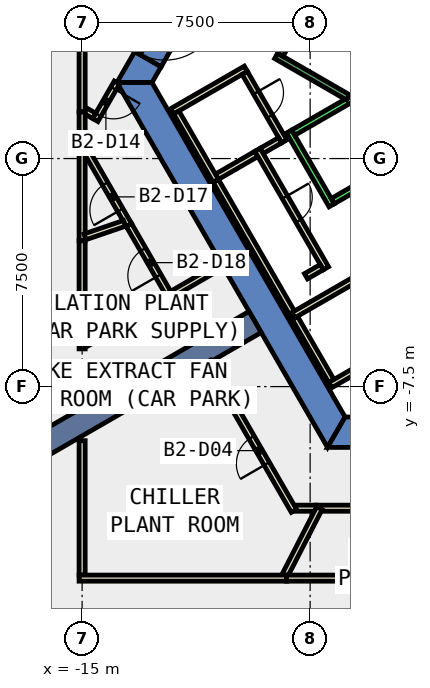
"""IFC4 building model, lengths in metres.
Left out: names, types, materials, properties, quantities, classifications, styles, units other than length and angle.
Written with IfcOpenShell. Run it as: python <this file> out.ifc"""

import sys

from ifc_helpers import new_model, si_unit, direction, frame, frame_2d, origin, place, context, subcontext, project, spatial, polyline, rectangle, outline, extrude, element, fill, save


model = new_model("IFC4")
c1 = context("Model", 3, precision=1e-05, world=origin(), true_north=direction((0.0, 1.0)))
c2 = subcontext(c1, "Body", "Model", "MODEL_VIEW")
j1 = project(units=[si_unit("LENGTHUNIT", "METRE"), si_unit("PLANEANGLEUNIT", "RADIAN")], contexts=[c1])
p1 = place(None, origin())
s1 = spatial("IfcSite", under=j1, at=p1, CompositionType="ELEMENT")
p2 = place(p1, origin())
s2 = spatial("IfcBuilding", under=s1, at=p2, CompositionType="ELEMENT")
p3 = place(p2, frame((0.0, 0.0, -11.0)))
s3 = spatial("IfcBuildingStorey", under=s2, at=p3, CompositionType="ELEMENT", Elevation=-11.0)
p4 = place(p3, frame((0.0, 0.0, -0.42)))
e1 = element("IfcWall", 1, at=p4, inside=s3, PredefinedType="SHEAR", context=c2, shape_type="SweptSolid", body=[
    extrude(outline(polyline([(-12.402, 3.02), (-13.267, 3.52), (-13.856, 2.5), (-12.702, 2.5), (-12.402, 3.02)])), origin(), (0.0, 0.0, 1.0), 5.5),
])
p5 = place(p3, frame((0.0, 0.0, 3.6)))
e2 = element("IfcWall", 2, at=p5, inside=s3, PredefinedType="SHEAR", context=c2, shape_type="SweptSolid", body=[
    extrude(outline(polyline([(-13.267, 3.52), (-12.402, 3.02), (-11.402, 4.752), (-12.267, 5.252), (-13.267, 3.52)])), origin(), (0.0, 0.0, 1.0), 1.48),
])
p6 = place(p3, frame((0.0, 0.0, -0.42)))
e3 = element("IfcWall", 3, at=p6, inside=s3, PredefinedType="SHEAR", context=c2, shape_type="SweptSolid", body=[
    extrude(outline(polyline([(-13.856, 2.5), (-6.928, -9.5), (-6.351, -8.5), (-12.702, 2.5), (-13.856, 2.5)])), origin(), (0.0, 0.0, 1.0), 5.5),
])
p7 = place(p3, frame((0.0, 0.0, -0.42)))
e4 = element("IfcWall", 4, at=p7, inside=s3, PredefinedType="SHEAR", context=c2, shape_type="SweptSolid", body=[
    extrude(outline(polyline([(3.75, -9.5), (3.75, -8.5), (-6.351, -8.5), (-6.928, -9.5), (3.75, -9.5)])), origin(), (0.0, 0.0, 1.0), 5.5),
])
p8 = place(p3, frame((-9.31, -5.375, -0.42), z_axis=(0.0, 0.0, 1.0), x_axis=(-0.866017533419, -0.500013631625, 0.0)))
e5 = element("IfcWall", 5, at=p8, inside=s3, PredefinedType="SHEAR", context=c2, shape_type="SweptSolid", body=[
    extrude(rectangle(XDim=9.0, YDim=0.8, at=frame_2d((4.5, 0.0))), origin(), (0.0, 0.0, 1.0), 5.5),
])
p9 = place(p3, frame((-7.296, -11.5, 0.0), z_axis=(0.0, 0.0, 1.0), x_axis=(-1.0, 0.0, 0.0)))
e6 = element("IfcWall", 6, at=p9, inside=s3, PredefinedType="PARTITIONING", context=c2, shape_type="SweptSolid", body=[
    extrude(rectangle(XDim=0.687, YDim=0.2, at=frame_2d((0.344, 0.0))), origin(), (0.0, 0.0, 1.0), 5.05),
])
p10 = place(p3, frame((-8.033, -11.587, 0.0), z_axis=(0.0, 0.0, 1.0), x_axis=(-0.499974742752, 0.866039985572, 0.0)))
e7 = element("IfcWall", 7, at=p10, inside=s3, PredefinedType="PARTITIONING", context=c2, shape_type="SweptSolid", body=[
    extrude(rectangle(XDim=5.668, YDim=0.2, at=frame_2d((2.834, 0.0))), origin(), (0.0, 0.0, 1.0), 5.05),
])
p11 = place(p10, frame((1.788, 0.0, 0.0)))
e8 = element("IfcOpeningElement", 8, at=p11, cuts=e7, PredefinedType="OPENING", context=c2, shape_type="SweptSolid", body=[
    extrude(rectangle(XDim=1.0, YDim=2.1, at=frame_2d((0.5, 1.05))), frame((0.0, 0.11, 0.0), z_axis=(0.0, -1.0, 0.0), x_axis=(1.0, 0.0, 0.0)), (0.0, 0.0, 1.0), 0.22),
])
p12 = place(p3, frame((1.35, -11.5, 0.0), z_axis=(0.0, 0.0, 1.0), x_axis=(-1.0, 0.0, 0.0)))
e9 = element("IfcWall", 9, at=p12, inside=s3, PredefinedType="PARTITIONING", context=c2, shape_type="SweptSolid", body=[
    extrude(rectangle(XDim=8.646, YDim=0.2, at=frame_2d((4.323, 0.0))), origin(), (0.0, 0.0, 1.0), 5.05),
])
p13 = place(p12, frame((3.768, 0.0, 0.0)))
e10 = element("IfcOpeningElement", 10, at=p13, cuts=e9, PredefinedType="OPENING", context=c2, shape_type="SweptSolid", body=[
    extrude(rectangle(XDim=1.0, YDim=2.1, at=frame_2d((0.5, 1.05))), frame((0.0, 0.11, 0.0), z_axis=(0.0, -1.0, 0.0), x_axis=(1.0, 0.0, 0.0)), (0.0, 0.0, 1.0), 0.22),
])
p14 = place(p3, frame((-7.196, -11.5, 0.0), z_axis=(0.0, 0.0, 1.0), x_axis=(-0.457008432814, -0.889462361394, 0.0)))
e11 = element("IfcWall", 11, at=p14, inside=s3, PredefinedType="PARTITIONING", context=c2, shape_type="SweptSolid", body=[
    extrude(rectangle(XDim=2.486, YDim=0.2, at=frame_2d((1.243, 0.0))), origin(), (0.0, 0.0, 1.0), 5.05),
])
p15 = place(p3, frame((-15.0, -13.7, 0.0), z_axis=(0.0, 0.0, 1.0), x_axis=(0.0, 1.0, 0.0)))
e12 = element("IfcWall", 12, at=p15, inside=s3, PredefinedType="PARTITIONING", context=c2, shape_type="SweptSolid", body=[
    extrude(rectangle(XDim=4.42, YDim=0.2, at=frame_2d((2.21, 0.0))), origin(), (0.0, 0.0, 1.0), 5.05),
])
p16 = place(p3, frame((-8.278, -13.8, 0.0), z_axis=(0.0, 0.0, 1.0), x_axis=(-1.0, 0.0, 0.0)))
e13 = element("IfcWall", 13, at=p16, inside=s3, PredefinedType="PARTITIONING", context=c2, shape_type="SweptSolid", body=[
    extrude(rectangle(XDim=6.822, YDim=0.2, at=frame_2d((3.411, 0.0))), origin(), (0.0, 0.0, 1.0), 5.05),
])
p17 = place(p3, frame((1.497, -13.8, 0.0), z_axis=(0.0, 0.0, 1.0), x_axis=(-1.0, 0.0, 0.0)))
e14 = element("IfcWall", 14, at=p17, inside=s3, PredefinedType="PARTITIONING", context=c2, shape_type="SweptSolid", body=[
    extrude(rectangle(XDim=9.775, YDim=0.2, at=frame_2d((4.888, 0.0))), origin(), (0.0, 0.0, 1.0), 5.05),
])
p18 = place(p3, frame((-13.856, 2.5, 0.0), z_axis=(0.0, 0.0, 1.0), x_axis=(-0.499831418649, -0.866122712398, 0.0)))
e15 = element("IfcWall", 15, at=p18, inside=s3, PredefinedType="PARTITIONING", context=c2, shape_type="SweptSolid", body=[
    extrude(rectangle(XDim=1.422, YDim=0.2, at=frame_2d((0.711, 0.0))), origin(), (0.0, 0.0, 1.0), 5.05),
])
p19 = place(p18, frame((0.224, 0.0, 0.0)))
e16 = element("IfcOpeningElement", 16, at=p19, cuts=e15, PredefinedType="OPENING", context=c2, shape_type="SweptSolid", body=[
    extrude(rectangle(XDim=1.0, YDim=2.1, at=frame_2d((0.5, 1.05))), frame((0.0, 0.11, 0.0), z_axis=(0.0, -1.0, 0.0), x_axis=(1.0, 0.0, 0.0)), (0.0, 0.0, 1.0), 0.22),
])
p20 = place(p3, frame((-14.604, 1.405, 0.0), z_axis=(0.0, 0.0, 1.0), x_axis=(-0.865410684717, 0.501063216349, 0.0)))
e17 = element("IfcWall", 17, at=p20, inside=s3, PredefinedType="PARTITIONING", context=c2, shape_type="SweptSolid", body=[
    extrude(rectangle(XDim=0.357, YDim=0.2, at=frame_2d((0.179, 0.0))), origin(), (0.0, 0.0, 1.0), 5.05),
])
p21 = place(p3, frame((-15.0, 1.534, 0.0), z_axis=(0.0, 0.0, 1.0), x_axis=(0.0, 1.0, 0.0)))
e18 = element("IfcWall", 18, at=p21, inside=s3, PredefinedType="PARTITIONING", context=c2, shape_type="SweptSolid", body=[
    extrude(rectangle(XDim=3.784, YDim=0.2, at=frame_2d((1.892, 0.0))), origin(), (0.0, 0.0, 1.0), 5.05),
])
p22 = place(p3, frame((-10.392, -3.5, 0.0), z_axis=(0.0, 0.0, 1.0), x_axis=(-0.865980106173, -0.500078449558, 0.0)))
e19 = element("IfcWall", 19, at=p22, inside=s3, PredefinedType="PARTITIONING", context=c2, shape_type="SweptSolid", body=[
    extrude(rectangle(XDim=1.9, YDim=0.2, at=frame_2d((0.95, 0.0))), origin(), (0.0, 0.0, 1.0), 5.05),
])
p23 = place(p3, frame((-15.0, 0.581, 0.0), z_axis=(0.0, 0.0, 1.0), x_axis=(0.0, 1.0, 0.0)))
e20 = element("IfcWall", 20, at=p23, inside=s3, PredefinedType="PARTITIONING", context=c2, shape_type="SweptSolid", body=[
    extrude(rectangle(XDim=0.953, YDim=0.2, at=frame_2d((0.477, 0.0))), origin(), (0.0, 0.0, 1.0), 5.05),
])
p24 = place(p3, frame((-13.46, -2.186, 0.0), z_axis=(0.0, 0.0, 1.0), x_axis=(-0.500060979923, 0.865990194147, 0.0)))
e21 = element("IfcWall", 21, at=p24, inside=s3, PredefinedType="PARTITIONING", context=c2, shape_type="SweptSolid", body=[
    extrude(rectangle(XDim=3.08, YDim=0.2, at=frame_2d((1.54, 0.0))), origin(), (0.0, 0.0, 1.0), 5.05),
])
p25 = place(p24, frame((0.569, 0.0, 0.0)))
e22 = element("IfcOpeningElement", 22, at=p25, cuts=e21, PredefinedType="OPENING", context=c2, shape_type="SweptSolid", body=[
    extrude(rectangle(XDim=1.0, YDim=2.1, at=frame_2d((0.5, 1.05))), frame((0.0, 0.11, 0.0), z_axis=(0.0, -1.0, 0.0), x_axis=(1.0, 0.0, 0.0)), (0.0, 0.0, 1.0), 0.22),
])
p26 = place(p3, frame((-12.124, -4.5, 0.0), z_axis=(0.0, 0.0, 1.0), x_axis=(-0.499991375441, 0.866030383119, 0.0)))
e23 = element("IfcWall", 23, at=p26, inside=s3, PredefinedType="PARTITIONING", context=c2, shape_type="SweptSolid", body=[
    extrude(rectangle(XDim=2.672, YDim=0.2, at=frame_2d((1.336, 0.0))), origin(), (0.0, 0.0, 1.0), 5.05),
])
p27 = place(p26, frame((0.743, 0.0, 0.0)))
e24 = element("IfcOpeningElement", 24, at=p27, cuts=e23, PredefinedType="OPENING", context=c2, shape_type="SweptSolid", body=[
    extrude(rectangle(XDim=1.0, YDim=2.1, at=frame_2d((0.5, 1.05))), frame((0.0, 0.11, 0.0), z_axis=(0.0, -1.0, 0.0), x_axis=(1.0, 0.0, 0.0)), (0.0, 0.0, 1.0), 0.22),
])
p28 = place(p3, frame((-15.0, -2.706, 0.0), z_axis=(0.0, 0.0, 1.0), x_axis=(0.0, 1.0, 0.0)))
e25 = element("IfcWall", 25, at=p28, inside=s3, PredefinedType="PARTITIONING", context=c2, shape_type="SweptSolid", body=[
    extrude(rectangle(XDim=3.287, YDim=0.2, at=frame_2d((1.644, 0.0))), origin(), (0.0, 0.0, 1.0), 5.05),
])
p29 = place(p3, frame((-12.037, -4.45, 0.0), z_axis=(0.0, 0.0, 1.0), x_axis=(-0.866063163075, -0.499934593286, 0.0)))
e26 = element("IfcWall", 26, at=p29, inside=s3, PredefinedType="PARTITIONING", context=c2, shape_type="SweptSolid", body=[
    extrude(rectangle(XDim=3.321, YDim=0.2, at=frame_2d((1.66, 0.0))), origin(), (0.0, 0.0, 1.0), 5.05),
])
p30 = place(p3, frame((-15.0, -6.26, 0.0), z_axis=(0.0, 0.0, 1.0), x_axis=(0.0, 1.0, 0.0)))
e27 = element("IfcWall", 27, at=p30, inside=s3, PredefinedType="PARTITIONING", context=c2, shape_type="SweptSolid", body=[
    extrude(rectangle(XDim=3.554, YDim=0.2, at=frame_2d((1.777, 0.0))), origin(), (0.0, 0.0, 1.0), 5.05),
])
p31 = place(p3, frame((-13.605, -2.131, 0.0), z_axis=(0.0, 0.0, 1.0), x_axis=(-0.946582963452, -0.32246037478, 0.0)))
e28 = element("IfcWall", 28, at=p31, inside=s3, PredefinedType="PARTITIONING", context=c2, shape_type="SweptSolid", body=[
    extrude(rectangle(XDim=1.373, YDim=0.2, at=frame_2d((0.687, 0.0))), origin(), (0.0, 0.0, 1.0), 5.05),
])
p32 = place(p3, frame((-9.267, 0.152, 0.0), z_axis=(0.0, 0.0, 1.0), x_axis=(-0.86599040064, -0.500060622324, 0.0)))
e29 = element("IfcWall", 29, at=p32, inside=s3, PredefinedType="PARTITIONING", context=c2, shape_type="SweptSolid", body=[
    extrude(rectangle(XDim=1.5, YDim=0.2, at=frame_2d((0.75, 0.0))), origin(), (0.0, 0.0, 1.0), 5.05),
])
p33 = place(p3, frame((-12.04, 1.553, 0.0), z_axis=(0.0, 0.0, 1.0), x_axis=(0.866056369097, 0.49994636267, 0.0)))
e30 = element("IfcWall", 30, at=p33, inside=s3, PredefinedType="PARTITIONING", context=c2, shape_type="SweptSolid", body=[
    extrude(rectangle(XDim=2.8, YDim=0.2, at=frame_2d((1.4, 0.0))), origin(), (0.0, 0.0, 1.0), 5.05),
])
p34 = place(p3, frame((-9.651, 2.817, 0.0), z_axis=(0.0, 0.0, 1.0), x_axis=(0.49989585183, -0.866085525409, 0.0)))
e31 = element("IfcWall", 31, at=p34, inside=s3, PredefinedType="PARTITIONING", context=c2, shape_type="SweptSolid", body=[
    extrude(rectangle(XDim=2.6, YDim=0.2, at=frame_2d((1.3, 0.0))), origin(), (0.0, 0.0, 1.0), 5.05),
])
p35 = place(p34, frame((0.75, 0.0, 0.0)))
e32 = element("IfcOpeningElement", 32, at=p35, cuts=e31, PredefinedType="OPENING", context=c2, shape_type="SweptSolid", body=[
    extrude(rectangle(XDim=0.9, YDim=2.1, at=frame_2d((0.45, 1.05))), frame((0.0, 0.11, 0.0), z_axis=(0.0, -1.0, 0.0), x_axis=(1.0, 0.0, 0.0)), (0.0, 0.0, 1.0), 0.22),
])
p36 = place(p3, frame((-8.488, 0.602, 0.0), z_axis=(0.0, 0.0, 1.0), x_axis=(-0.865871789474, -0.500265973451, 0.0)))
e33 = element("IfcWall", 33, at=p36, inside=s3, PredefinedType="PARTITIONING", context=c2, shape_type="SweptSolid", body=[
    extrude(rectangle(XDim=0.7, YDim=0.2, at=frame_2d((0.35, 0.0))), origin(), (0.0, 0.0, 1.0), 5.05),
])
p37 = place(p3, frame((-10.603, -0.735, 0.0), z_axis=(0.0, 0.0, 1.0), x_axis=(-0.499925626596, 0.866068339032, 0.0)))
e34 = element("IfcWall", 34, at=p37, inside=s3, PredefinedType="PARTITIONING", context=c2, shape_type="SweptSolid", body=[
    extrude(rectangle(XDim=2.601, YDim=0.2, at=frame_2d((1.3, 0.0))), origin(), (0.0, 0.0, 1.0), 5.05),
])
p38 = place(p3, frame((-9.231, 0.288, 0.0), z_axis=(0.0, 0.0, 1.0), x_axis=(0.500013631625, -0.866017533419, 0.0)))
e35 = element("IfcWall", 35, at=p38, inside=s3, PredefinedType="PARTITIONING", context=c2, shape_type="SweptSolid", body=[
    extrude(rectangle(XDim=4.5, YDim=0.2, at=frame_2d((2.25, 0.0))), origin(), (0.0, 0.0, 1.0), 5.05),
])
p39 = place(p38, frame((1.8, 0.0, 0.0)))
e36 = element("IfcOpeningElement", 36, at=p39, cuts=e35, PredefinedType="OPENING", context=c2, shape_type="SweptSolid", body=[
    extrude(rectangle(XDim=0.9, YDim=2.1, at=frame_2d((0.45, 1.05))), frame((0.0, 0.11, 0.0), z_axis=(0.0, -1.0, 0.0), x_axis=(1.0, 0.0, 0.0)), (0.0, 0.0, 1.0), 0.22),
])
p40 = place(p3, frame((-7.117, -3.572, 0.0), z_axis=(0.0, 0.0, 1.0), x_axis=(-0.866158505053, -0.499769390944, 0.0)))
e37 = element("IfcWall", 37, at=p40, inside=s3, PredefinedType="PARTITIONING", context=c2, shape_type="SweptSolid", body=[
    extrude(rectangle(XDim=0.6, YDim=0.2, at=frame_2d((0.3, 0.0))), origin(), (0.0, 0.0, 1.0), 5.05),
])
p41 = place(p3, frame((-8.003, -5.238, 0.0), z_axis=(0.0, 0.0, 1.0), x_axis=(-0.500047596559, 0.865997922154, 0.0)))
e38 = element("IfcWall", 38, at=p41, inside=s3, PredefinedType="PARTITIONING", context=c2, shape_type="SweptSolid", body=[
    extrude(rectangle(XDim=5.2, YDim=0.2, at=frame_2d((2.6, 0.0))), origin(), (0.0, 0.0, 1.0), 5.05),
])
p42 = place(p3, frame((-6.803, -7.317, 0.0), z_axis=(0.0, 0.0, 1.0), x_axis=(-0.499913221443, 0.866075499611, 0.0)))
e39 = element("IfcWall", 39, at=p42, inside=s3, PredefinedType="PARTITIONING", context=c2, shape_type="SweptSolid", body=[
    extrude(rectangle(XDim=2.4, YDim=0.2, at=frame_2d((1.2, 0.0))), origin(), (0.0, 0.0, 1.0), 5.05),
])
p43 = place(p3, frame((-8.053, -5.151, 0.0), z_axis=(0.0, 0.0, 1.0), x_axis=(0.866234368172, 0.499637888272, 0.0)))
e40 = element("IfcWall", 40, at=p43, inside=s3, PredefinedType="PARTITIONING", context=c2, shape_type="SweptSolid", body=[
    extrude(rectangle(XDim=2.499, YDim=0.2, at=frame_2d((1.25, 0.0))), origin(), (0.0, 0.0, 1.0), 5.05),
])
p44 = place(p3, frame((-4.415, -6.053, 0.0), z_axis=(0.0, 0.0, 1.0), x_axis=(-0.866056369097, -0.49994636267, 0.0)))
e41 = element("IfcWall", 41, at=p44, inside=s3, PredefinedType="PARTITIONING", context=c2, shape_type="SweptSolid", body=[
    extrude(rectangle(XDim=2.8, YDim=0.2, at=frame_2d((1.4, 0.0))), origin(), (0.0, 0.0, 1.0), 5.05),
])
p45 = place(p3, frame((-12.18, 5.202, 0.0), z_axis=(0.0, 0.0, 1.0), x_axis=(-0.50002537861, -0.866010750942, 0.0)))
e42 = element("IfcWall", 42, at=p45, inside=s3, PredefinedType="PARTITIONING", context=c2, shape_type="SweptSolid", body=[
    extrude(rectangle(XDim=2.0, YDim=0.2, at=frame_2d((1.0, 0.0))), origin(), (0.0, 0.0, 1.0), 2.4),
])
p46 = place(p45, frame((0.19, 0.0, 0.0)))
e43 = element("IfcOpeningElement", 43, at=p46, cuts=e42, PredefinedType="OPENING", context=c2, shape_type="SweptSolid", body=[
    extrude(rectangle(XDim=1.8, YDim=2.1, at=frame_2d((0.9, 1.05))), frame((0.0, 0.11, 0.0), z_axis=(0.0, -1.0, 0.0), x_axis=(1.0, 0.0, 0.0)), (0.0, 0.0, 1.0), 0.22),
])
p47 = place(p3, frame((-8.192, 0.888, 0.0), z_axis=(0.0, 0.0, 1.0), x_axis=(0.49994636267, -0.866056369097, 0.0)))
e44 = element("IfcWall", 44, at=p47, inside=s3, PredefinedType="STANDARD", context=c2, shape_type="SweptSolid", body=[
    extrude(rectangle(XDim=2.8, YDim=0.2, at=frame_2d((1.4, 0.0))), origin(), (0.0, 0.0, 1.0), 5.05),
])
for number, where, z_axis, x_axis in (
    (45, (-5.977, 2.052, 0.0), (0.0, 0.0, 1.0), (-0.866, -0.5, 0.0)),
    (46, (-4.677, -0.2, 0.0), (0.0, 0.0, 1.0), (-0.866, -0.5, 0.0)),
):
    element("IfcWall", number, at=place(p3, frame(where, z_axis=z_axis, x_axis=x_axis)), inside=s3, PredefinedType="STANDARD", context=c2, shape_type="SweptSolid", body=[
        extrude(rectangle(XDim=2.399, YDim=0.2, at=frame_2d((1.2, 0.0))), origin(), (0.0, 0.0, 1.0), 5.05),
    ])
p48 = place(p3, frame((-6.25, 2.01, 0.0), z_axis=(0.0, 0.0, 1.0), x_axis=(-0.86611865017, 0.499838457731, 0.0)))
e47 = element("IfcWall", 47, at=p48, inside=s3, PredefinedType="STANDARD", context=c2, shape_type="SweptSolid", body=[
    extrude(rectangle(XDim=2.733, YDim=0.2, at=frame_2d((1.366, 0.0))), origin(), (0.0, 0.0, 1.0), 5.05),
])
p49 = place(p3, frame((-5.03, 9.388, 0.0), z_axis=(0.0, 0.0, 1.0), x_axis=(-0.499978703459, -0.866037698999, 0.0)))
e48 = element("IfcWall", 48, at=p49, inside=s3, PredefinedType="STANDARD", context=c2, shape_type="SweptSolid", body=[
    extrude(rectangle(XDim=6.9, YDim=0.2, at=frame_2d((3.45, 0.0))), origin(), (0.0, 0.0, 1.0), 5.05),
])
p50 = place(p11, origin())
e49 = element("IfcDoor", 49, at=p50, inside=s3, OperationType="SINGLE_SWING_RIGHT", PredefinedType="DOOR", context=c2, shape_type="SweptSolid", body=[
    extrude(rectangle(XDim=1.0, YDim=2.1, at=frame_2d((0.5, 1.05))), frame((0.0, 0.025, 0.0), z_axis=(0.0, -1.0, 0.0), x_axis=(1.0, 0.0, 0.0)), (0.0, 0.0, 1.0), 0.05),
])
fill(e8, e49)
p51 = place(p19, origin())
e50 = element("IfcDoor", 50, at=p51, inside=s3, OperationType="SINGLE_SWING_RIGHT", PredefinedType="DOOR", context=c2, shape_type="SweptSolid", body=[
    extrude(rectangle(XDim=1.0, YDim=2.1, at=frame_2d((0.5, 1.05))), frame((0.0, 0.025, 0.0), z_axis=(0.0, -1.0, 0.0), x_axis=(1.0, 0.0, 0.0)), (0.0, 0.0, 1.0), 0.05),
])
fill(e16, e50)
p52 = place(p25, origin())
e51 = element("IfcDoor", 51, at=p52, inside=s3, OperationType="SINGLE_SWING_LEFT", PredefinedType="DOOR", context=c2, shape_type="SweptSolid", body=[
    extrude(rectangle(XDim=1.0, YDim=2.1, at=frame_2d((0.5, 1.05))), frame((0.0, 0.025, 0.0), z_axis=(0.0, -1.0, 0.0), x_axis=(1.0, 0.0, 0.0)), (0.0, 0.0, 1.0), 0.05),
])
fill(e22, e51)
p53 = place(p27, origin())
e52 = element("IfcDoor", 52, at=p53, inside=s3, OperationType="SINGLE_SWING_RIGHT", PredefinedType="DOOR", context=c2, shape_type="SweptSolid", body=[
    extrude(rectangle(XDim=1.0, YDim=2.1, at=frame_2d((0.5, 1.05))), frame((0.0, 0.025, 0.0), z_axis=(0.0, -1.0, 0.0), x_axis=(1.0, 0.0, 0.0)), (0.0, 0.0, 1.0), 0.05),
])
fill(e24, e52)
p54 = place(p35, origin())
e53 = element("IfcDoor", 53, at=p54, inside=s3, OperationType="SINGLE_SWING_RIGHT", PredefinedType="DOOR", context=c2, shape_type="SweptSolid", body=[
    extrude(rectangle(XDim=0.9, YDim=2.1, at=frame_2d((0.45, 1.05))), frame((0.0, 0.025, 0.0), z_axis=(0.0, -1.0, 0.0), x_axis=(1.0, 0.0, 0.0)), (0.0, 0.0, 1.0), 0.05),
])
fill(e32, e53)
p55 = place(p39, origin())
e54 = element("IfcDoor", 54, at=p55, inside=s3, OperationType="SINGLE_SWING_LEFT", PredefinedType="DOOR", context=c2, shape_type="SweptSolid", body=[
    extrude(rectangle(XDim=0.9, YDim=2.1, at=frame_2d((0.45, 1.05))), frame((0.0, 0.025, 0.0), z_axis=(0.0, -1.0, 0.0), x_axis=(1.0, 0.0, 0.0)), (0.0, 0.0, 1.0), 0.05),
])
fill(e36, e54)
p56 = place(p46, origin())
e55 = element("IfcDoor", 55, at=p56, inside=s3, OperationType="DOUBLE_DOOR_SINGLE_SWING", PredefinedType="DOOR", context=c2, shape_type="SweptSolid", body=[
    extrude(rectangle(XDim=1.8, YDim=2.1, at=frame_2d((0.9, 1.05))), frame((0.0, 0.025, 0.0), z_axis=(0.0, -1.0, 0.0), x_axis=(1.0, 0.0, 0.0)), (0.0, 0.0, 1.0), 0.05),
])
fill(e43, e55)
save(model, sys.argv[1])
